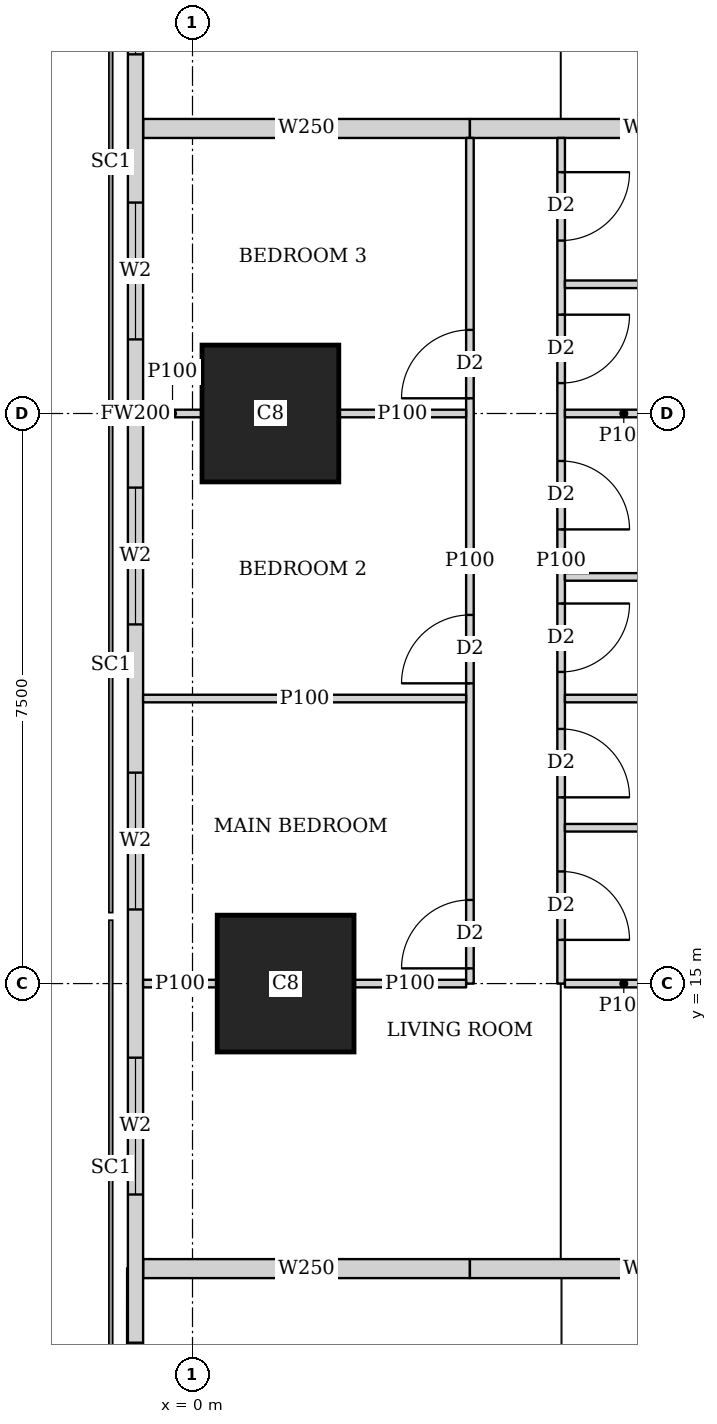
"""IFC4 building model, lengths in metres.
Left out: names, types, materials, properties, quantities, classifications, styles, units other than length and angle.
Written with IfcOpenShell. Run it as: python <this file> out.ifc"""

import sys

from ifc_helpers import new_model, si_unit, direction, frame, frame_2d, origin, origin_2d, place, context, subcontext, project, spatial, rectangle, extrude, element, fill, save


model = new_model("IFC4")
c1 = context("Model", 3, precision=1e-05, world=origin(), true_north=direction((0.0, 1.0)))
c2 = subcontext(c1, "Body", "Model", "MODEL_VIEW")
j1 = project(units=[si_unit("LENGTHUNIT", "METRE"), si_unit("PLANEANGLEUNIT", "RADIAN")], contexts=[c1])
p1 = place(None, origin())
s1 = spatial("IfcSite", under=j1, at=p1, CompositionType="ELEMENT")
p2 = place(p1, origin())
s2 = spatial("IfcBuilding", under=s1, at=p2, CompositionType="ELEMENT")
p3 = place(p2, frame((0.0, 0.0, 139.55)))
s3 = spatial("IfcBuildingStorey", under=s2, at=p3, CompositionType="ELEMENT", Elevation=139.55)
for number, where, z_axis, x_axis in (
    (1, (1.225, 15.0, 0.0), (0.0, 0.0, 1.0), (1.0, 0.0, 0.0)),
    (2, (1.025, 22.5, 0.0), (0.0, 0.0, 1.0), (1.0, 0.0, 0.0)),
):
    element("IfcColumn", number, at=place(p3, frame(where, z_axis=z_axis, x_axis=x_axis)), inside=s3, PredefinedType="COLUMN", context=c2, shape_type="SweptSolid", body=[
        extrude(rectangle(XDim=1.8, YDim=1.8, at=origin_2d()), origin(), (0.0, 0.0, 1.0), 3.75),
    ])
p4 = place(p3, frame((-0.75, 42.837, 0.0), z_axis=(0.0, 0.0, 1.0), x_axis=(0.0, -1.0, 0.0)))
e3 = element("IfcWall", 3, at=p4, inside=s3, PredefinedType="SOLIDWALL", context=c2, shape_type="SweptSolid", body=[
    extrude(rectangle(XDim=40.674, YDim=0.2, at=frame_2d((20.337, 0.0))), origin(), (0.0, 0.0, 1.0), 3.5),
])
p5 = place(p4, frame((1.78, 0.0, 0.9)))
e4 = element("IfcOpeningElement", 4, at=p5, cuts=e3, PredefinedType="OPENING", context=c2, shape_type="SweptSolid", body=[
    extrude(rectangle(XDim=1.8, YDim=1.5, at=frame_2d((0.9, 0.75))), frame((0.0, 0.11, 0.0), z_axis=(0.0, -1.0, 0.0), x_axis=(1.0, 0.0, 0.0)), (0.0, 0.0, 1.0), 0.22),
])
p6 = place(p4, frame((6.312, 0.0, 0.9)))
e5 = element("IfcOpeningElement", 5, at=p6, cuts=e3, PredefinedType="OPENING", context=c2, shape_type="SweptSolid", body=[
    extrude(rectangle(XDim=1.8, YDim=1.5, at=frame_2d((0.9, 0.75))), frame((0.0, 0.11, 0.0), z_axis=(0.0, -1.0, 0.0), x_axis=(1.0, 0.0, 0.0)), (0.0, 0.0, 1.0), 0.22),
])
p7 = place(p4, frame((10.062, 0.0, 0.9)))
e6 = element("IfcOpeningElement", 6, at=p7, cuts=e3, PredefinedType="OPENING", context=c2, shape_type="SweptSolid", body=[
    extrude(rectangle(XDim=1.8, YDim=1.5, at=frame_2d((0.9, 0.75))), frame((0.0, 0.11, 0.0), z_axis=(0.0, -1.0, 0.0), x_axis=(1.0, 0.0, 0.0)), (0.0, 0.0, 1.0), 0.22),
])
p8 = place(p4, frame((13.812, 0.0, 0.9)))
e7 = element("IfcOpeningElement", 7, at=p8, cuts=e3, PredefinedType="OPENING", context=c2, shape_type="SweptSolid", body=[
    extrude(rectangle(XDim=1.8, YDim=1.5, at=frame_2d((0.9, 0.75))), frame((0.0, 0.11, 0.0), z_axis=(0.0, -1.0, 0.0), x_axis=(1.0, 0.0, 0.0)), (0.0, 0.0, 1.0), 0.22),
])
p9 = place(p4, frame((17.562, 0.0, 0.9)))
e8 = element("IfcOpeningElement", 8, at=p9, cuts=e3, PredefinedType="OPENING", context=c2, shape_type="SweptSolid", body=[
    extrude(rectangle(XDim=1.8, YDim=1.5, at=frame_2d((0.9, 0.75))), frame((0.0, 0.11, 0.0), z_axis=(0.0, -1.0, 0.0), x_axis=(1.0, 0.0, 0.0)), (0.0, 0.0, 1.0), 0.22),
])
p10 = place(p4, frame((21.312, 0.0, 0.9)))
e9 = element("IfcOpeningElement", 9, at=p10, cuts=e3, PredefinedType="OPENING", context=c2, shape_type="SweptSolid", body=[
    extrude(rectangle(XDim=1.8, YDim=1.5, at=frame_2d((0.9, 0.75))), frame((0.0, 0.11, 0.0), z_axis=(0.0, -1.0, 0.0), x_axis=(1.0, 0.0, 0.0)), (0.0, 0.0, 1.0), 0.22),
])
p11 = place(p4, frame((25.062, 0.0, 0.9)))
e10 = element("IfcOpeningElement", 10, at=p11, cuts=e3, PredefinedType="OPENING", context=c2, shape_type="SweptSolid", body=[
    extrude(rectangle(XDim=1.8, YDim=1.5, at=frame_2d((0.9, 0.75))), frame((0.0, 0.11, 0.0), z_axis=(0.0, -1.0, 0.0), x_axis=(1.0, 0.0, 0.0)), (0.0, 0.0, 1.0), 0.22),
])
p12 = place(p4, frame((28.812, 0.0, 0.9)))
e11 = element("IfcOpeningElement", 11, at=p12, cuts=e3, PredefinedType="OPENING", context=c2, shape_type="SweptSolid", body=[
    extrude(rectangle(XDim=1.8, YDim=1.5, at=frame_2d((0.9, 0.75))), frame((0.0, 0.11, 0.0), z_axis=(0.0, -1.0, 0.0), x_axis=(1.0, 0.0, 0.0)), (0.0, 0.0, 1.0), 0.22),
])
p13 = place(p4, frame((32.562, 0.0, 0.9)))
e12 = element("IfcOpeningElement", 12, at=p13, cuts=e3, PredefinedType="OPENING", context=c2, shape_type="SweptSolid", body=[
    extrude(rectangle(XDim=1.8, YDim=1.5, at=frame_2d((0.9, 0.75))), frame((0.0, 0.11, 0.0), z_axis=(0.0, -1.0, 0.0), x_axis=(1.0, 0.0, 0.0)), (0.0, 0.0, 1.0), 0.22),
])
p14 = place(p4, frame((37.094, 0.0, 0.9)))
e13 = element("IfcOpeningElement", 13, at=p14, cuts=e3, PredefinedType="OPENING", context=c2, shape_type="SweptSolid", body=[
    extrude(rectangle(XDim=1.8, YDim=1.5, at=frame_2d((0.9, 0.75))), frame((0.0, 0.11, 0.0), z_axis=(0.0, -1.0, 0.0), x_axis=(1.0, 0.0, 0.0)), (0.0, 0.0, 1.0), 0.22),
])
p15 = place(p3, frame((3.65, 15.0, 0.0), z_axis=(0.0, 0.0, 1.0), x_axis=(0.0, 1.0, 0.0)))
e14 = element("IfcWall", 14, at=p15, inside=s3, PredefinedType="PARTITIONING", context=c2, shape_type="SweptSolid", body=[
    extrude(rectangle(XDim=11.125, YDim=0.1, at=frame_2d((5.562, 0.0))), origin(), (0.0, 0.0, 1.0), 3.5),
])
p16 = place(p15, frame((0.2, 0.0, 0.0)))
e15 = element("IfcOpeningElement", 15, at=p16, cuts=e14, PredefinedType="OPENING", context=c2, shape_type="SweptSolid", body=[
    extrude(rectangle(XDim=0.9, YDim=2.1, at=frame_2d((0.45, 1.05))), frame((0.0, 0.06, 0.0), z_axis=(0.0, -1.0, 0.0), x_axis=(1.0, 0.0, 0.0)), (0.0, 0.0, 1.0), 0.12),
])
p17 = place(p15, frame((3.95, 0.0, 0.0)))
e16 = element("IfcOpeningElement", 16, at=p17, cuts=e14, PredefinedType="OPENING", context=c2, shape_type="SweptSolid", body=[
    extrude(rectangle(XDim=0.9, YDim=2.1, at=frame_2d((0.45, 1.05))), frame((0.0, 0.06, 0.0), z_axis=(0.0, -1.0, 0.0), x_axis=(1.0, 0.0, 0.0)), (0.0, 0.0, 1.0), 0.12),
])
p18 = place(p15, frame((7.7, 0.0, 0.0)))
e17 = element("IfcOpeningElement", 17, at=p18, cuts=e14, PredefinedType="OPENING", context=c2, shape_type="SweptSolid", body=[
    extrude(rectangle(XDim=0.9, YDim=2.1, at=frame_2d((0.45, 1.05))), frame((0.0, 0.06, 0.0), z_axis=(0.0, -1.0, 0.0), x_axis=(1.0, 0.0, 0.0)), (0.0, 0.0, 1.0), 0.12),
])
p19 = place(p3, frame((4.85, 15.0, 0.0), z_axis=(0.0, 0.0, 1.0), x_axis=(0.0, 1.0, 0.0)))
e18 = element("IfcWall", 18, at=p19, inside=s3, PredefinedType="PARTITIONING", context=c2, shape_type="SweptSolid", body=[
    extrude(rectangle(XDim=11.125, YDim=0.1, at=frame_2d((5.562, 0.0))), origin(), (0.0, 0.0, 1.0), 3.5),
])
p20 = place(p19, frame((0.575, 0.0, 0.0)))
e19 = element("IfcOpeningElement", 19, at=p20, cuts=e18, PredefinedType="OPENING", context=c2, shape_type="SweptSolid", body=[
    extrude(rectangle(XDim=0.9, YDim=2.1, at=frame_2d((0.45, 1.05))), frame((0.0, 0.06, 0.0), z_axis=(0.0, -1.0, 0.0), x_axis=(1.0, 0.0, 0.0)), (0.0, 0.0, 1.0), 0.12),
])
p21 = place(p19, frame((4.1, 0.0, 0.0)))
e20 = element("IfcOpeningElement", 20, at=p21, cuts=e18, PredefinedType="OPENING", context=c2, shape_type="SweptSolid", body=[
    extrude(rectangle(XDim=0.9, YDim=2.1, at=frame_2d((0.45, 1.05))), frame((0.0, 0.06, 0.0), z_axis=(0.0, -1.0, 0.0), x_axis=(1.0, 0.0, 0.0)), (0.0, 0.0, 1.0), 0.12),
])
p22 = place(p19, frame((7.9, 0.0, 0.0)))
e21 = element("IfcOpeningElement", 21, at=p22, cuts=e18, PredefinedType="OPENING", context=c2, shape_type="SweptSolid", body=[
    extrude(rectangle(XDim=0.9, YDim=2.1, at=frame_2d((0.45, 1.05))), frame((0.0, 0.06, 0.0), z_axis=(0.0, -1.0, 0.0), x_axis=(1.0, 0.0, 0.0)), (0.0, 0.0, 1.0), 0.12),
])
p23 = place(p19, frame((2.45, 0.0, 0.0)))
e22 = element("IfcOpeningElement", 22, at=p23, cuts=e18, PredefinedType="OPENING", context=c2, shape_type="SweptSolid", body=[
    extrude(rectangle(XDim=0.9, YDim=2.1, at=frame_2d((0.45, 1.05))), frame((0.0, 0.06, 0.0), z_axis=(0.0, -1.0, 0.0), x_axis=(1.0, 0.0, 0.0)), (0.0, 0.0, 1.0), 0.12),
])
p24 = place(p19, frame((5.975, 0.0, 0.0)))
e23 = element("IfcOpeningElement", 23, at=p24, cuts=e18, PredefinedType="OPENING", context=c2, shape_type="SweptSolid", body=[
    extrude(rectangle(XDim=0.9, YDim=2.1, at=frame_2d((0.45, 1.05))), frame((0.0, 0.06, 0.0), z_axis=(0.0, -1.0, 0.0), x_axis=(1.0, 0.0, 0.0)), (0.0, 0.0, 1.0), 0.12),
])
p25 = place(p19, frame((9.775, 0.0, 0.0)))
e24 = element("IfcOpeningElement", 24, at=p25, cuts=e18, PredefinedType="OPENING", context=c2, shape_type="SweptSolid", body=[
    extrude(rectangle(XDim=0.9, YDim=2.1, at=frame_2d((0.45, 1.05))), frame((0.0, 0.06, 0.0), z_axis=(0.0, -1.0, 0.0), x_axis=(1.0, 0.0, 0.0)), (0.0, 0.0, 1.0), 0.12),
])
p26 = place(p3, frame((-0.65, 15.0, 0.0), z_axis=(0.0, 0.0, 1.0), x_axis=(1.0, 0.0, 0.0)))
e25 = element("IfcWall", 25, at=p26, inside=s3, PredefinedType="PARTITIONING", context=c2, shape_type="SweptSolid", body=[
    extrude(rectangle(XDim=0.974, YDim=0.1, at=frame_2d((0.487, 0.0))), origin(), (0.0, 0.0, 1.0), 3.5),
])
p27 = place(p3, frame((2.126, 15.0, 0.0), z_axis=(0.0, 0.0, 1.0), x_axis=(1.0, 0.0, 0.0)))
e26 = element("IfcWall", 26, at=p27, inside=s3, PredefinedType="PARTITIONING", context=c2, shape_type="SweptSolid", body=[
    extrude(rectangle(XDim=1.474, YDim=0.1, at=frame_2d((0.737, 0.0))), origin(), (0.0, 0.0, 1.0), 3.5),
])
p28 = place(p3, frame((-0.65, 18.75, 0.0), z_axis=(0.0, 0.0, 1.0), x_axis=(1.0, 0.0, 0.0)))
e27 = element("IfcWall", 27, at=p28, inside=s3, PredefinedType="PARTITIONING", context=c2, shape_type="SweptSolid", body=[
    extrude(rectangle(XDim=4.25, YDim=0.1, at=frame_2d((2.125, 0.0))), origin(), (0.0, 0.0, 1.0), 2.1),
])
p29 = place(p3, frame((-0.65, 22.5, 0.0), z_axis=(0.0, 0.0, 1.0), x_axis=(1.0, 0.0, 0.0)))
e28 = element("IfcWall", 28, at=p29, inside=s3, PredefinedType="PARTITIONING", context=c2, shape_type="SweptSolid", body=[
    extrude(rectangle(XDim=0.774, YDim=0.1, at=frame_2d((0.387, 0.0))), origin(), (0.0, 0.0, 1.0), 3.5),
])
p30 = place(p3, frame((1.926, 22.5, 0.0), z_axis=(0.0, 0.0, 1.0), x_axis=(1.0, 0.0, 0.0)))
e29 = element("IfcWall", 29, at=p30, inside=s3, PredefinedType="PARTITIONING", context=c2, shape_type="SweptSolid", body=[
    extrude(rectangle(XDim=1.674, YDim=0.1, at=frame_2d((0.837, 0.0))), origin(), (0.0, 0.0, 1.0), 3.5),
])
p31 = place(p3, frame((4.9, 15.0, 0.0), z_axis=(0.0, 0.0, 1.0), x_axis=(1.0, 0.0, 0.0)))
e30 = element("IfcWall", 30, at=p31, inside=s3, PredefinedType="PARTITIONING", context=c2, shape_type="SweptSolid", body=[
    extrude(rectangle(XDim=1.549, YDim=0.1, at=frame_2d((0.774, 0.0))), origin(), (0.0, 0.0, 1.0), 3.5),
])
p32 = place(p3, frame((4.9, 18.75, 0.0), z_axis=(0.0, 0.0, 1.0), x_axis=(1.0, 0.0, 0.0)))
e31 = element("IfcWall", 31, at=p32, inside=s3, PredefinedType="PARTITIONING", context=c2, shape_type="SweptSolid", body=[
    extrude(rectangle(XDim=3.525, YDim=0.1, at=frame_2d((1.763, 0.0))), origin(), (0.0, 0.0, 1.0), 3.5),
])
p33 = place(p3, frame((4.9, 22.5, 0.0), z_axis=(0.0, 0.0, 1.0), x_axis=(1.0, 0.0, 0.0)))
e32 = element("IfcWall", 32, at=p33, inside=s3, PredefinedType="PARTITIONING", context=c2, shape_type="SweptSolid", body=[
    extrude(rectangle(XDim=1.549, YDim=0.1, at=frame_2d((0.774, 0.0))), origin(), (0.0, 0.0, 1.0), 3.5),
])
for number, where, z_axis, x_axis in (
    (33, (4.9, 17.05, 0.0), (0.0, 0.0, 1.0), (1.0, 0.0, 0.0)),
    (34, (4.9, 20.35, 0.0), (0.0, 0.0, 1.0), (1.0, 0.0, 0.0)),
    (35, (4.9, 24.2, 0.0), (0.0, 0.0, 1.0), (1.0, 0.0, 0.0)),
):
    element("IfcWall", number, at=place(p3, frame(where, z_axis=z_axis, x_axis=x_axis)), inside=s3, PredefinedType="PARTITIONING", context=c2, shape_type="SweptSolid", body=[
        extrude(rectangle(XDim=3.525, YDim=0.1, at=frame_2d((1.763, 0.0))), origin(), (0.0, 0.0, 1.0), 3.5),
    ])
p34 = place(p3, frame((-0.65, 11.25, 0.0), z_axis=(0.0, 0.0, 1.0), x_axis=(1.0, 0.0, 0.0)))
e36 = element("IfcWall", 36, at=p34, inside=s3, PredefinedType="SOLIDWALL", context=c2, shape_type="SweptSolid", body=[
    extrude(rectangle(XDim=4.3, YDim=0.25, at=frame_2d((2.15, 0.0))), origin(), (0.0, 0.0, 1.0), 2.1),
])
p35 = place(p3, frame((3.65, 11.25, 0.0), z_axis=(0.0, 0.0, 1.0), x_axis=(1.0, 0.0, 0.0)))
e37 = element("IfcWall", 37, at=p35, inside=s3, PredefinedType="SOLIDWALL", context=c2, shape_type="SweptSolid", body=[
    extrude(rectangle(XDim=4.775, YDim=0.25, at=frame_2d((2.388, 0.0))), origin(), (0.0, 0.0, 1.0), 3.5),
])
p36 = place(p3, frame((-0.65, 26.25, 0.0), z_axis=(0.0, 0.0, 1.0), x_axis=(1.0, 0.0, 0.0)))
e38 = element("IfcWall", 38, at=p36, inside=s3, PredefinedType="SOLIDWALL", context=c2, shape_type="SweptSolid", body=[
    extrude(rectangle(XDim=4.3, YDim=0.25, at=frame_2d((2.15, 0.0))), origin(), (0.0, 0.0, 1.0), 2.1),
])
p37 = place(p3, frame((3.65, 26.25, 0.0), z_axis=(0.0, 0.0, 1.0), x_axis=(1.0, 0.0, 0.0)))
e39 = element("IfcWall", 39, at=p37, inside=s3, PredefinedType="SOLIDWALL", context=c2, shape_type="SweptSolid", body=[
    extrude(rectangle(XDim=4.775, YDim=0.25, at=frame_2d((2.388, 0.0))), origin(), (0.0, 0.0, 1.0), 3.5),
])
p38 = place(p8, origin())
e40 = element("IfcWindow", 40, at=p38, inside=s3, PartitioningType="SINGLE_PANEL", PredefinedType="WINDOW", context=c2, shape_type="SweptSolid", body=[
    extrude(rectangle(XDim=1.8, YDim=1.5, at=frame_2d((0.9, 0.75))), frame((0.0, 0.03, 0.0), z_axis=(0.0, -1.0, 0.0), x_axis=(1.0, 0.0, 0.0)), (0.0, 0.0, 1.0), 0.06),
])
fill(e7, e40)
p39 = place(p9, origin())
e41 = element("IfcWindow", 41, at=p39, inside=s3, PartitioningType="SINGLE_PANEL", PredefinedType="WINDOW", context=c2, shape_type="SweptSolid", body=[
    extrude(rectangle(XDim=1.8, YDim=1.5, at=frame_2d((0.9, 0.75))), frame((0.0, 0.03, 0.0), z_axis=(0.0, -1.0, 0.0), x_axis=(1.0, 0.0, 0.0)), (0.0, 0.0, 1.0), 0.06),
])
fill(e8, e41)
p40 = place(p10, origin())
e42 = element("IfcWindow", 42, at=p40, inside=s3, PartitioningType="SINGLE_PANEL", PredefinedType="WINDOW", context=c2, shape_type="SweptSolid", body=[
    extrude(rectangle(XDim=1.8, YDim=1.5, at=frame_2d((0.9, 0.75))), frame((0.0, 0.03, 0.0), z_axis=(0.0, -1.0, 0.0), x_axis=(1.0, 0.0, 0.0)), (0.0, 0.0, 1.0), 0.06),
])
fill(e9, e42)
p41 = place(p11, origin())
e43 = element("IfcWindow", 43, at=p41, inside=s3, PartitioningType="SINGLE_PANEL", PredefinedType="WINDOW", context=c2, shape_type="SweptSolid", body=[
    extrude(rectangle(XDim=1.8, YDim=1.5, at=frame_2d((0.9, 0.75))), frame((0.0, 0.03, 0.0), z_axis=(0.0, -1.0, 0.0), x_axis=(1.0, 0.0, 0.0)), (0.0, 0.0, 1.0), 0.06),
])
fill(e10, e43)
p42 = place(p12, origin())
e44 = element("IfcWindow", 44, at=p42, inside=s3, PartitioningType="SINGLE_PANEL", PredefinedType="WINDOW", context=c2, shape_type="SweptSolid", body=[
    extrude(rectangle(XDim=1.8, YDim=1.5, at=frame_2d((0.9, 0.75))), frame((0.0, 0.03, 0.0), z_axis=(0.0, -1.0, 0.0), x_axis=(1.0, 0.0, 0.0)), (0.0, 0.0, 1.0), 0.06),
])
fill(e11, e44)
p43 = place(p13, origin())
e45 = element("IfcWindow", 45, at=p43, inside=s3, PartitioningType="SINGLE_PANEL", PredefinedType="WINDOW", context=c2, shape_type="SweptSolid", body=[
    extrude(rectangle(XDim=1.8, YDim=1.5, at=frame_2d((0.9, 0.75))), frame((0.0, 0.03, 0.0), z_axis=(0.0, -1.0, 0.0), x_axis=(1.0, 0.0, 0.0)), (0.0, 0.0, 1.0), 0.06),
])
fill(e12, e45)
p44 = place(p16, origin())
e46 = element("IfcDoor", 46, at=p44, inside=s3, OperationType="SINGLE_SWING_LEFT", PredefinedType="DOOR", context=c2, shape_type="SweptSolid", body=[
    extrude(rectangle(XDim=0.9, YDim=2.1, at=frame_2d((0.45, 1.05))), frame((0.0, 0.025, 0.0), z_axis=(0.0, -1.0, 0.0), x_axis=(1.0, 0.0, 0.0)), (0.0, 0.0, 1.0), 0.05),
])
fill(e15, e46)
p45 = place(p17, origin())
e47 = element("IfcDoor", 47, at=p45, inside=s3, OperationType="SINGLE_SWING_LEFT", PredefinedType="DOOR", context=c2, shape_type="SweptSolid", body=[
    extrude(rectangle(XDim=0.9, YDim=2.1, at=frame_2d((0.45, 1.05))), frame((0.0, 0.025, 0.0), z_axis=(0.0, -1.0, 0.0), x_axis=(1.0, 0.0, 0.0)), (0.0, 0.0, 1.0), 0.05),
])
fill(e16, e47)
p46 = place(p18, origin())
e48 = element("IfcDoor", 48, at=p46, inside=s3, OperationType="SINGLE_SWING_LEFT", PredefinedType="DOOR", context=c2, shape_type="SweptSolid", body=[
    extrude(rectangle(XDim=0.9, YDim=2.1, at=frame_2d((0.45, 1.05))), frame((0.0, 0.025, 0.0), z_axis=(0.0, -1.0, 0.0), x_axis=(1.0, 0.0, 0.0)), (0.0, 0.0, 1.0), 0.05),
])
fill(e17, e48)
p47 = place(p20, origin())
e49 = element("IfcDoor", 49, at=p47, inside=s3, OperationType="SINGLE_SWING_RIGHT", PredefinedType="DOOR", context=c2, shape_type="SweptSolid", body=[
    extrude(rectangle(XDim=0.9, YDim=2.1, at=frame_2d((0.45, 1.05))), frame((0.0, 0.025, 0.0), z_axis=(0.0, -1.0, 0.0), x_axis=(1.0, 0.0, 0.0)), (0.0, 0.0, 1.0), 0.05),
])
fill(e19, e49)
p48 = place(p21, origin())
e50 = element("IfcDoor", 50, at=p48, inside=s3, OperationType="SINGLE_SWING_LEFT", PredefinedType="DOOR", context=c2, shape_type="SweptSolid", body=[
    extrude(rectangle(XDim=0.9, YDim=2.1, at=frame_2d((0.45, 1.05))), frame((0.0, 0.025, 0.0), z_axis=(0.0, -1.0, 0.0), x_axis=(1.0, 0.0, 0.0)), (0.0, 0.0, 1.0), 0.05),
])
fill(e20, e50)
p49 = place(p22, origin())
e51 = element("IfcDoor", 51, at=p49, inside=s3, OperationType="SINGLE_SWING_LEFT", PredefinedType="DOOR", context=c2, shape_type="SweptSolid", body=[
    extrude(rectangle(XDim=0.9, YDim=2.1, at=frame_2d((0.45, 1.05))), frame((0.0, 0.025, 0.0), z_axis=(0.0, -1.0, 0.0), x_axis=(1.0, 0.0, 0.0)), (0.0, 0.0, 1.0), 0.05),
])
fill(e21, e51)
p50 = place(p23, origin())
e52 = element("IfcDoor", 52, at=p50, inside=s3, OperationType="SINGLE_SWING_RIGHT", PredefinedType="DOOR", context=c2, shape_type="SweptSolid", body=[
    extrude(rectangle(XDim=0.9, YDim=2.1, at=frame_2d((0.45, 1.05))), frame((0.0, 0.025, 0.0), z_axis=(0.0, -1.0, 0.0), x_axis=(1.0, 0.0, 0.0)), (0.0, 0.0, 1.0), 0.05),
])
fill(e22, e52)
p51 = place(p24, origin())
e53 = element("IfcDoor", 53, at=p51, inside=s3, OperationType="SINGLE_SWING_RIGHT", PredefinedType="DOOR", context=c2, shape_type="SweptSolid", body=[
    extrude(rectangle(XDim=0.9, YDim=2.1, at=frame_2d((0.45, 1.05))), frame((0.0, 0.025, 0.0), z_axis=(0.0, -1.0, 0.0), x_axis=(1.0, 0.0, 0.0)), (0.0, 0.0, 1.0), 0.05),
])
fill(e23, e53)
p52 = place(p25, origin())
e54 = element("IfcDoor", 54, at=p52, inside=s3, OperationType="SINGLE_SWING_LEFT", PredefinedType="DOOR", context=c2, shape_type="SweptSolid", body=[
    extrude(rectangle(XDim=0.9, YDim=2.1, at=frame_2d((0.45, 1.05))), frame((0.0, 0.025, 0.0), z_axis=(0.0, -1.0, 0.0), x_axis=(1.0, 0.0, 0.0)), (0.0, 0.0, 1.0), 0.05),
])
fill(e24, e54)
save(model, sys.argv[1])
